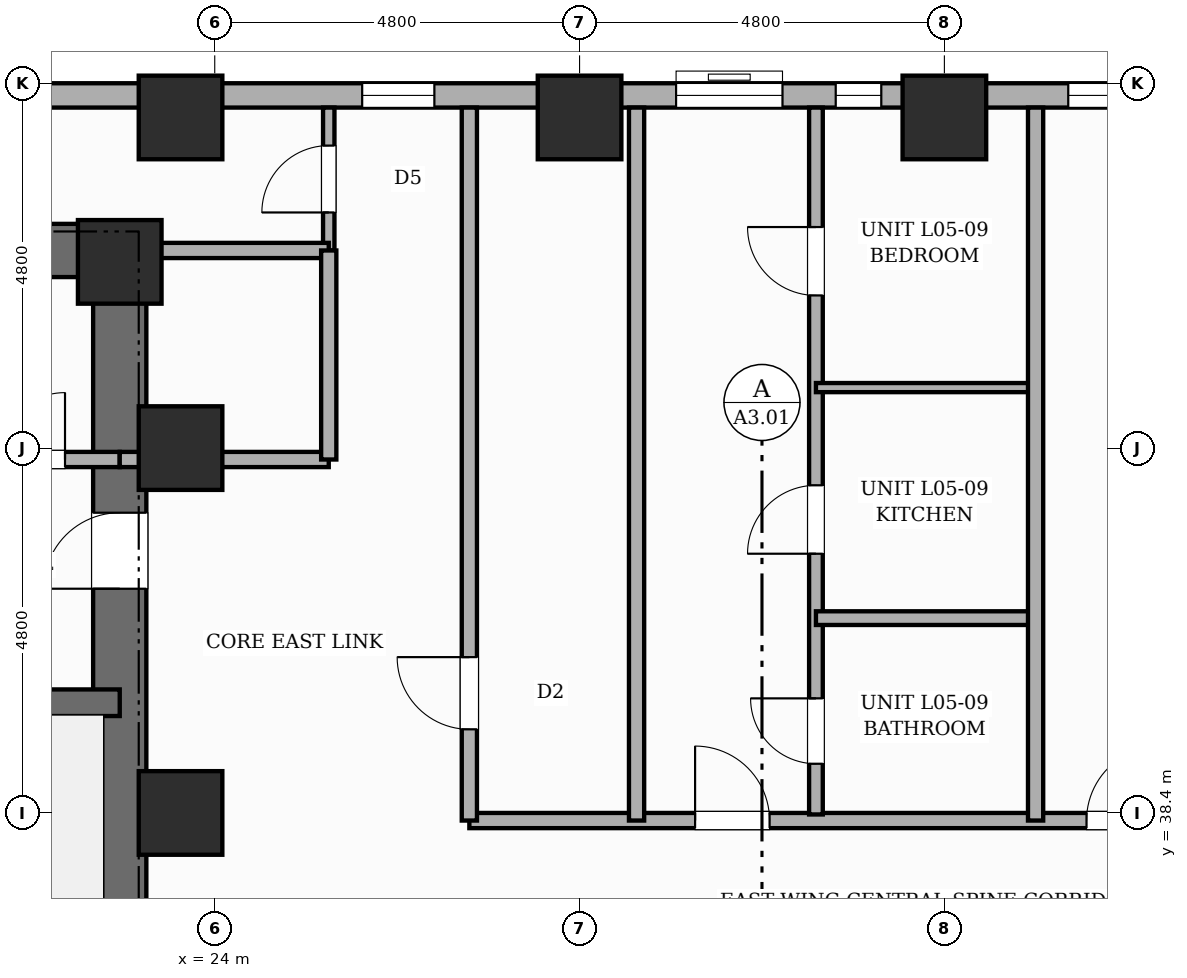
"""IFC4 building model, lengths in metres.
Left out: names, types, materials, properties, quantities, classifications, styles, units other than length and angle.
Written with IfcOpenShell. Run it as: python <this file> out.ifc"""

import sys

from ifc_helpers import new_model, si_unit, direction, frame, frame_2d, origin, origin_2d, place, context, subcontext, project, spatial, rectangle, extrude, element, fill, save


model = new_model("IFC4")
c1 = context("Model", 3, precision=1e-05, world=origin(), true_north=direction((0.0, 1.0)))
c2 = subcontext(c1, "Body", "Model", "MODEL_VIEW")
j1 = project(units=[si_unit("LENGTHUNIT", "METRE"), si_unit("PLANEANGLEUNIT", "RADIAN")], contexts=[c1])
p1 = place(None, origin())
s1 = spatial("IfcSite", under=j1, at=p1, CompositionType="ELEMENT")
p2 = place(p1, origin())
s2 = spatial("IfcBuilding", under=s1, at=p2, CompositionType="ELEMENT")
p3 = place(p2, frame((0.0, 0.0, 25.0)))
s3 = spatial("IfcBuildingStorey", under=s2, at=p3, CompositionType="ELEMENT", Elevation=25.0)
p4 = place(p3, frame((22.75, 30.55, 0.0), z_axis=(0.0, 0.0, 1.0), x_axis=(0.0, 1.0, 0.0)))
e1 = element("IfcWall", 1, at=p4, inside=s3, PredefinedType="SHEAR", context=c2, shape_type="SweptSolid", body=[
    extrude(rectangle(XDim=15.6, YDim=0.7, at=frame_2d((7.8, 0.0))), origin(), (0.0, 0.0, 1.0), 3.6),
])
p5 = place(p4, frame((10.8, 0.0, 0.0)))
e2 = element("IfcOpeningElement", 2, at=p5, cuts=e1, PredefinedType="OPENING", context=c2, shape_type="SweptSolid", body=[
    extrude(rectangle(XDim=1.0, YDim=2.15, at=frame_2d((0.5, 1.075))), frame((0.0, 0.36, 0.0), z_axis=(0.0, -1.0, 0.0), x_axis=(1.0, 0.0, 0.0)), (0.0, 0.0, 1.0), 0.72),
])
p6 = place(p3, frame((6.05, 45.8, 0.0), z_axis=(0.0, 0.0, 1.0), x_axis=(1.0, 0.0, 0.0)))
e3 = element("IfcWall", 3, at=p6, inside=s3, PredefinedType="SHEAR", context=c2, shape_type="SweptSolid", body=[
    extrude(rectangle(XDim=16.7, YDim=0.7, at=frame_2d((8.35, 0.0))), origin(), (0.0, 0.0, 1.0), 3.6),
])
p7 = place(p3, frame((18.84, 39.85, 0.0), z_axis=(0.0, 0.0, 1.0), x_axis=(1.0, 0.0, 0.0)))
e4 = element("IfcWall", 4, at=p7, inside=s3, PredefinedType="SHEAR", context=c2, shape_type="SweptSolid", body=[
    extrude(rectangle(XDim=3.91, YDim=0.35, at=frame_2d((1.955, 0.0))), origin(), (0.0, 0.0, 1.0), 3.6),
])
for number, where, z_axis, x_axis in (
    (5, (22.75, 45.65, 0.0), (0.0, 0.0, 1.0), (1.0, 0.0, 0.0)),
    (6, (23.55, 38.4, 0.0), (0.0, 0.0, 1.0), (1.0, 0.0, 0.0)),
    (7, (23.55, 43.2, 0.0), (0.0, 0.0, 1.0), (1.0, 0.0, 0.0)),
    (8, (23.55, 47.55, 0.0), (0.0, 0.0, 1.0), (1.0, 0.0, 0.0)),
    (9, (28.8, 47.55, 0.0), (0.0, 0.0, 1.0), (1.0, 0.0, 0.0)),
    (10, (33.6, 47.55, 0.0), (0.0, 0.0, 1.0), (1.0, 0.0, 0.0)),
):
    element("IfcColumn", number, at=place(p3, frame(where, z_axis=z_axis, x_axis=x_axis)), inside=s3, PredefinedType="COLUMN", context=c2, shape_type="SweptSolid", body=[
        extrude(rectangle(XDim=1.1, YDim=1.1, at=origin_2d()), origin(), (0.0, 0.0, 1.0), 3.6),
    ])
p8 = place(p3, frame((7.2, 47.84, 0.0), z_axis=(0.0, 0.0, 1.0), x_axis=(1.0, 0.0, 0.0)))
e11 = element("IfcWall", 11, at=p8, inside=s3, PredefinedType="STANDARD", context=c2, shape_type="SweptSolid", body=[
    extrude(rectangle(XDim=48.0, YDim=0.32, at=frame_2d((24.0, 0.0))), origin(), (0.0, 0.0, 1.0), 2.53),
])
p9 = place(p8, frame((24.97, 0.0, 0.45)))
e12 = element("IfcOpeningElement", 12, at=p9, cuts=e11, PredefinedType="OPENING", context=c2, shape_type="SweptSolid", body=[
    extrude(rectangle(XDim=0.6, YDim=1.8, at=frame_2d((0.3, 0.9))), frame((0.0, 0.17, 0.0), z_axis=(0.0, -1.0, 0.0), x_axis=(1.0, 0.0, 0.0)), (0.0, 0.0, 1.0), 0.34),
])
p10 = place(p8, frame((32.435, 0.0, 0.65)))
e13 = element("IfcOpeningElement", 13, at=p10, cuts=e11, PredefinedType="OPENING", context=c2, shape_type="SweptSolid", body=[
    extrude(rectangle(XDim=1.4, YDim=1.1, at=frame_2d((0.7, 0.55))), frame((0.0, 0.17, 0.0), z_axis=(0.0, -1.0, 0.0), x_axis=(1.0, 0.0, 0.0)), (0.0, 0.0, 1.0), 0.34),
])
p11 = place(p8, frame((47.094, 0.0, 0.45)))
e14 = element("IfcOpeningElement", 14, at=p11, cuts=e11, PredefinedType="OPENING", context=c2, shape_type="SweptSolid", body=[
    extrude(rectangle(XDim=0.6, YDim=1.8, at=frame_2d((0.3, 0.9))), frame((0.0, 0.17, 0.0), z_axis=(0.0, -1.0, 0.0), x_axis=(1.0, 0.0, 0.0)), (0.0, 0.0, 1.0), 0.34),
])
p12 = place(p8, frame((18.74, 0.0, 0.45)))
e15 = element("IfcOpeningElement", 15, at=p12, cuts=e11, PredefinedType="OPENING", context=c2, shape_type="SweptSolid", body=[
    extrude(rectangle(XDim=0.95, YDim=1.8, at=frame_2d((0.475, 0.9))), frame((0.0, 0.17, 0.0), z_axis=(0.0, -1.0, 0.0), x_axis=(1.0, 0.0, 0.0)), (0.0, 0.0, 1.0), 0.34),
])
p13 = place(p8, frame((41.65, 0.0, 0.45)))
e16 = element("IfcOpeningElement", 16, at=p13, cuts=e11, PredefinedType="OPENING", context=c2, shape_type="SweptSolid", body=[
    extrude(rectangle(XDim=0.75, YDim=1.8, at=frame_2d((0.375, 0.9))), frame((0.0, 0.17, 0.0), z_axis=(0.0, -1.0, 0.0), x_axis=(1.0, 0.0, 0.0)), (0.0, 0.0, 1.0), 0.34),
])
p14 = place(p8, frame((37.736, 0.0, 0.65)))
e17 = element("IfcOpeningElement", 17, at=p14, cuts=e11, PredefinedType="OPENING", context=c2, shape_type="SweptSolid", body=[
    extrude(rectangle(XDim=1.4, YDim=1.1, at=frame_2d((0.7, 0.55))), frame((0.0, 0.17, 0.0), z_axis=(0.0, -1.0, 0.0), x_axis=(1.0, 0.0, 0.0)), (0.0, 0.0, 1.0), 0.34),
])
p15 = place(p8, frame((0.47, 0.0, 0.45)))
e18 = element("IfcOpeningElement", 18, at=p15, cuts=e11, PredefinedType="OPENING", context=c2, shape_type="SweptSolid", body=[
    extrude(rectangle(XDim=0.95, YDim=1.8, at=frame_2d((0.475, 0.9))), frame((0.0, 0.17, 0.0), z_axis=(0.0, -1.0, 0.0), x_axis=(1.0, 0.0, 0.0)), (0.0, 0.0, 1.0), 0.34),
])
p16 = place(p8, frame((10.215, 0.0, 0.45)))
e19 = element("IfcOpeningElement", 19, at=p16, cuts=e11, PredefinedType="OPENING", context=c2, shape_type="SweptSolid", body=[
    extrude(rectangle(XDim=0.95, YDim=1.8, at=frame_2d((0.475, 0.9))), frame((0.0, 0.17, 0.0), z_axis=(0.0, -1.0, 0.0), x_axis=(1.0, 0.0, 0.0)), (0.0, 0.0, 1.0), 0.34),
])
p17 = place(p8, frame((22.87, 0.0, 0.65)))
e20 = element("IfcOpeningElement", 20, at=p17, cuts=e11, PredefinedType="OPENING", context=c2, shape_type="SweptSolid", body=[
    extrude(rectangle(XDim=1.4, YDim=1.1, at=frame_2d((0.7, 0.55))), frame((0.0, 0.17, 0.0), z_axis=(0.0, -1.0, 0.0), x_axis=(1.0, 0.0, 0.0)), (0.0, 0.0, 1.0), 0.34),
])
p18 = place(p8, frame((28.03, 0.0, 0.65)))
e21 = element("IfcOpeningElement", 21, at=p18, cuts=e11, PredefinedType="OPENING", context=c2, shape_type="SweptSolid", body=[
    extrude(rectangle(XDim=1.4, YDim=1.1, at=frame_2d((0.7, 0.55))), frame((0.0, 0.17, 0.0), z_axis=(0.0, -1.0, 0.0), x_axis=(1.0, 0.0, 0.0)), (0.0, 0.0, 1.0), 0.34),
])
p19 = place(p8, frame((42.95, 0.0, 0.65)))
e22 = element("IfcOpeningElement", 22, at=p19, cuts=e11, PredefinedType="OPENING", context=c2, shape_type="SweptSolid", body=[
    extrude(rectangle(XDim=1.4, YDim=1.1, at=frame_2d((0.7, 0.55))), frame((0.0, 0.17, 0.0), z_axis=(0.0, -1.0, 0.0), x_axis=(1.0, 0.0, 0.0)), (0.0, 0.0, 1.0), 0.34),
])
p20 = place(p8, frame((45.984, 0.0, 0.45)))
e23 = element("IfcOpeningElement", 23, at=p20, cuts=e11, PredefinedType="OPENING", context=c2, shape_type="SweptSolid", body=[
    extrude(rectangle(XDim=0.6, YDim=1.8, at=frame_2d((0.3, 0.9))), frame((0.0, 0.17, 0.0), z_axis=(0.0, -1.0, 0.0), x_axis=(1.0, 0.0, 0.0)), (0.0, 0.0, 1.0), 0.34),
])
p21 = place(p3, frame((20.5, 43.05, 0.0), z_axis=(0.0, 0.0, 1.0), x_axis=(1.0, 0.0, 0.0)))
e24 = element("IfcWall", 24, at=p21, inside=s3, PredefinedType="POLYGONAL", context=c2, shape_type="SweptSolid", body=[
    extrude(rectangle(XDim=2.25, YDim=0.2, at=frame_2d((1.125, 0.0))), origin(), (0.0, 0.0, 1.0), 2.53),
])
p22 = place(p21, frame((0.65, 0.0, 0.0)))
e25 = element("IfcOpeningElement", 25, at=p22, cuts=e24, PredefinedType="OPENING", context=c2, shape_type="SweptSolid", body=[
    extrude(rectangle(XDim=0.88, YDim=2.1, at=frame_2d((0.44, 1.05))), frame((0.0, 0.11, 0.0), z_axis=(0.0, -1.0, 0.0), x_axis=(1.0, 0.0, 0.0)), (0.0, 0.0, 1.0), 0.22),
])
p23 = place(p3, frame((25.5, 45.8, 0.0), z_axis=(0.0, 0.0, 1.0), x_axis=(0.0, 1.0, 0.0)))
e26 = element("IfcWall", 26, at=p23, inside=s3, PredefinedType="PARTITIONING", context=c2, shape_type="SweptSolid", body=[
    extrude(rectangle(XDim=1.88, YDim=0.15, at=frame_2d((0.94, 0.0))), origin(), (0.0, 0.0, 1.0), 3.35),
])
p24 = place(p23, frame((0.5, 0.0, 0.0)))
e27 = element("IfcOpeningElement", 27, at=p24, cuts=e26, PredefinedType="OPENING", context=c2, shape_type="SweptSolid", body=[
    extrude(rectangle(XDim=0.88, YDim=2.1, at=frame_2d((0.44, 1.05))), frame((0.0, 0.085, 0.0), z_axis=(0.0, -1.0, 0.0), x_axis=(1.0, 0.0, 0.0)), (0.0, 0.0, 1.0), 0.17),
])
p25 = place(p3, frame((22.75, 45.8, 0.0), z_axis=(0.0, 0.0, 1.0), x_axis=(1.0, 0.0, 0.0)))
e28 = element("IfcWall", 28, at=p25, inside=s3, PredefinedType="PARTITIONING", context=c2, shape_type="SweptSolid", body=[
    extrude(rectangle(XDim=2.75, YDim=0.2, at=frame_2d((1.375, 0.0))), origin(), (0.0, 0.0, 1.0), 3.35),
])
p26 = place(p3, frame((27.35, 38.3, 0.0), z_axis=(0.0, 0.0, 1.0), x_axis=(1.0, 0.0, 0.0)))
e29 = element("IfcWall", 29, at=p26, inside=s3, PredefinedType="PARTITIONING", context=c2, shape_type="SweptSolid", body=[
    extrude(rectangle(XDim=14.43, YDim=0.2, at=frame_2d((7.215, 0.0))), origin(), (0.0, 0.0, 1.0), 3.35),
])
p27 = place(p26, frame((2.97, 0.0, 0.0)))
e30 = element("IfcOpeningElement", 30, at=p27, cuts=e29, PredefinedType="OPENING", context=c2, shape_type="SweptSolid", body=[
    extrude(rectangle(XDim=0.98, YDim=2.18, at=frame_2d((0.49, 1.09))), frame((0.0, 0.11, 0.0), z_axis=(0.0, -1.0, 0.0), x_axis=(1.0, 0.0, 0.0)), (0.0, 0.0, 1.0), 0.22),
])
p28 = place(p26, frame((8.12, 0.0, 0.0)))
e31 = element("IfcOpeningElement", 31, at=p28, cuts=e29, PredefinedType="OPENING", context=c2, shape_type="SweptSolid", body=[
    extrude(rectangle(XDim=0.98, YDim=2.18, at=frame_2d((0.49, 1.09))), frame((0.0, 0.11, 0.0), z_axis=(0.0, -1.0, 0.0), x_axis=(1.0, 0.0, 0.0)), (0.0, 0.0, 1.0), 0.22),
])
p29 = place(p3, frame((27.35, 38.3, 0.0), z_axis=(0.0, 0.0, 1.0), x_axis=(0.0, 1.0, 0.0)))
e32 = element("IfcWall", 32, at=p29, inside=s3, PredefinedType="PARTITIONING", context=c2, shape_type="SweptSolid", body=[
    extrude(rectangle(XDim=9.38, YDim=0.2, at=frame_2d((4.69, 0.0))), origin(), (0.0, 0.0, 1.0), 3.35),
])
p30 = place(p29, frame((1.2, 0.0, 0.0)))
e33 = element("IfcOpeningElement", 33, at=p30, cuts=e32, PredefinedType="OPENING", context=c2, shape_type="SweptSolid", body=[
    extrude(rectangle(XDim=0.95, YDim=2.15, at=frame_2d((0.475, 1.075))), frame((0.0, 0.11, 0.0), z_axis=(0.0, -1.0, 0.0), x_axis=(1.0, 0.0, 0.0)), (0.0, 0.0, 1.0), 0.22),
])
p31 = place(p3, frame((22.75, 43.05, 0.0), z_axis=(0.0, 0.0, 1.0), x_axis=(1.0, 0.0, 0.0)))
e34 = element("IfcWall", 34, at=p31, inside=s3, PredefinedType="PARTITIONING", context=c2, shape_type="SweptSolid", body=[
    extrude(rectangle(XDim=2.75, YDim=0.2, at=frame_2d((1.375, 0.0))), origin(), (0.0, 0.0, 1.0), 2.53),
])
p32 = place(p3, frame((25.5, 43.05, 0.0), z_axis=(0.0, 0.0, 1.0), x_axis=(0.0, 1.0, 0.0)))
e35 = element("IfcWall", 35, at=p32, inside=s3, PredefinedType="PARTITIONING", context=c2, shape_type="SweptSolid", body=[
    extrude(rectangle(XDim=2.75, YDim=0.2, at=frame_2d((1.375, 0.0))), origin(), (0.0, 0.0, 1.0), 3.35),
])
p33 = place(p3, frame((29.55, 38.3, 0.0), z_axis=(0.0, 0.0, 1.0), x_axis=(0.0, 1.0, 0.0)))
e36 = element("IfcWall", 36, at=p33, inside=s3, PredefinedType="SOLIDWALL", context=c2, shape_type="SweptSolid", body=[
    extrude(rectangle(XDim=9.38, YDim=0.2, at=frame_2d((4.69, 0.0))), origin(), (0.0, 0.0, 1.0), 3.35),
])
p34 = place(p3, frame((31.91, 38.38, 0.0), z_axis=(0.0, 0.0, 1.0), x_axis=(0.0, 1.0, 0.0)))
e37 = element("IfcWall", 37, at=p34, inside=s3, PredefinedType="PLUMBINGWALL", context=c2, shape_type="SweptSolid", body=[
    extrude(rectangle(XDim=9.3, YDim=0.18, at=frame_2d((4.65, 0.0))), origin(), (0.0, 0.0, 1.0), 3.35),
])
p35 = place(p34, frame((0.667, 0.0, 0.0)))
e38 = element("IfcOpeningElement", 38, at=p35, cuts=e37, PredefinedType="OPENING", context=c2, shape_type="SweptSolid", body=[
    extrude(rectangle(XDim=0.86, YDim=2.1, at=frame_2d((0.43, 1.05))), frame((0.0, 0.1, 0.0), z_axis=(0.0, -1.0, 0.0), x_axis=(1.0, 0.0, 0.0)), (0.0, 0.0, 1.0), 0.2),
])
p36 = place(p34, frame((3.43, 0.0, 0.0)))
e39 = element("IfcOpeningElement", 39, at=p36, cuts=e37, PredefinedType="OPENING", context=c2, shape_type="SweptSolid", body=[
    extrude(rectangle(XDim=0.9, YDim=2.15, at=frame_2d((0.45, 1.075))), frame((0.0, 0.1, 0.0), z_axis=(0.0, -1.0, 0.0), x_axis=(1.0, 0.0, 0.0)), (0.0, 0.0, 1.0), 0.2),
])
p37 = place(p34, frame((6.828, 0.0, 0.0)))
e40 = element("IfcOpeningElement", 40, at=p37, cuts=e37, PredefinedType="OPENING", context=c2, shape_type="SweptSolid", body=[
    extrude(rectangle(XDim=0.9, YDim=2.15, at=frame_2d((0.45, 1.075))), frame((0.0, 0.1, 0.0), z_axis=(0.0, -1.0, 0.0), x_axis=(1.0, 0.0, 0.0)), (0.0, 0.0, 1.0), 0.2),
])
p38 = place(p3, frame((31.91, 40.963, 0.0), z_axis=(0.0, 0.0, 1.0), x_axis=(1.0, 0.0, 0.0)))
e41 = element("IfcWall", 41, at=p38, inside=s3, PredefinedType="PLUMBINGWALL", context=c2, shape_type="SweptSolid", body=[
    extrude(rectangle(XDim=2.91, YDim=0.18, at=frame_2d((1.455, 0.0))), origin(), (0.0, 0.0, 1.0), 3.35),
])
p39 = place(p3, frame((31.91, 43.996, 0.0), z_axis=(0.0, 0.0, 1.0), x_axis=(1.0, 0.0, 0.0)))
e42 = element("IfcWall", 42, at=p39, inside=s3, PredefinedType="PARTITIONING", context=c2, shape_type="SweptSolid", body=[
    extrude(rectangle(XDim=2.91, YDim=0.12, at=frame_2d((1.455, 0.0))), origin(), (0.0, 0.0, 1.0), 3.35),
])
p40 = place(p3, frame((34.8, 38.3, 0.0), z_axis=(0.0, 0.0, 1.0), x_axis=(0.0, 1.0, 0.0)))
e43 = element("IfcWall", 43, at=p40, inside=s3, PredefinedType="SOLIDWALL", context=c2, shape_type="SweptSolid", body=[
    extrude(rectangle(XDim=9.38, YDim=0.2, at=frame_2d((4.69, 0.0))), origin(), (0.0, 0.0, 1.0), 3.35),
])
p41 = place(p9, origin())
e44 = element("IfcWindow", 44, at=p41, inside=s3, PartitioningType="SINGLE_PANEL", PredefinedType="WINDOW", context=c2, shape_type="SweptSolid", body=[
    extrude(rectangle(XDim=0.6, YDim=1.8, at=frame_2d((0.3, 0.9))), frame((0.0, 0.03, 0.0), z_axis=(0.0, -1.0, 0.0), x_axis=(1.0, 0.0, 0.0)), (0.0, 0.0, 1.0), 0.06),
])
fill(e12, e44)
p42 = place(p12, origin())
e45 = element("IfcWindow", 45, at=p42, inside=s3, PartitioningType="SINGLE_PANEL", PredefinedType="WINDOW", context=c2, shape_type="SweptSolid", body=[
    extrude(rectangle(XDim=0.95, YDim=1.8, at=frame_2d((0.475, 0.9))), frame((0.0, 0.03, 0.0), z_axis=(0.0, -1.0, 0.0), x_axis=(1.0, 0.0, 0.0)), (0.0, 0.0, 1.0), 0.06),
])
fill(e15, e45)
p43 = place(p17, origin())
e46 = element("IfcWindow", 46, at=p43, inside=s3, PartitioningType="SINGLE_PANEL", PredefinedType="WINDOW", context=c2, shape_type="SweptSolid", body=[
    extrude(rectangle(XDim=1.4, YDim=1.1, at=frame_2d((0.7, 0.55))), frame((0.0, 0.03, 0.0), z_axis=(0.0, -1.0, 0.0), x_axis=(1.0, 0.0, 0.0)), (0.0, 0.0, 1.0), 0.06),
])
fill(e20, e46)
p44 = place(p18, origin())
e47 = element("IfcWindow", 47, at=p44, inside=s3, PartitioningType="SINGLE_PANEL", PredefinedType="WINDOW", context=c2, shape_type="SweptSolid", body=[
    extrude(rectangle(XDim=1.4, YDim=1.1, at=frame_2d((0.7, 0.55))), frame((0.0, 0.03, 0.0), z_axis=(0.0, -1.0, 0.0), x_axis=(1.0, 0.0, 0.0)), (0.0, 0.0, 1.0), 0.06),
])
fill(e21, e47)
p45 = place(p5, origin())
e48 = element("IfcDoor", 48, at=p45, inside=s3, OperationType="SINGLE_SWING_LEFT", PredefinedType="DOOR", context=c2, shape_type="SweptSolid", body=[
    extrude(rectangle(XDim=1.0, YDim=2.15, at=frame_2d((0.5, 1.075))), frame((0.0, 0.025, 0.0), z_axis=(0.0, -1.0, 0.0), x_axis=(1.0, 0.0, 0.0)), (0.0, 0.0, 1.0), 0.05),
])
fill(e2, e48)
p46 = place(p22, origin())
e49 = element("IfcDoor", 49, at=p46, inside=s3, OperationType="SINGLE_SWING_RIGHT", PredefinedType="DOOR", context=c2, shape_type="SweptSolid", body=[
    extrude(rectangle(XDim=0.88, YDim=2.1, at=frame_2d((0.44, 1.05))), frame((0.0, 0.025, 0.0), z_axis=(0.0, -1.0, 0.0), x_axis=(1.0, 0.0, 0.0)), (0.0, 0.0, 1.0), 0.05),
])
fill(e25, e49)
p47 = place(p24, origin())
e50 = element("IfcDoor", 50, at=p47, inside=s3, OperationType="SINGLE_SWING_LEFT", PredefinedType="DOOR", context=c2, shape_type="SweptSolid", body=[
    extrude(rectangle(XDim=0.88, YDim=2.1, at=frame_2d((0.44, 1.05))), frame((0.0, 0.025, 0.0), z_axis=(0.0, -1.0, 0.0), x_axis=(1.0, 0.0, 0.0)), (0.0, 0.0, 1.0), 0.05),
])
fill(e27, e50)
p48 = place(p30, origin())
e51 = element("IfcDoor", 51, at=p48, inside=s3, OperationType="SINGLE_SWING_RIGHT", PredefinedType="DOOR", context=c2, shape_type="SweptSolid", body=[
    extrude(rectangle(XDim=0.95, YDim=2.15, at=frame_2d((0.475, 1.075))), frame((0.0, 0.025, 0.0), z_axis=(0.0, -1.0, 0.0), x_axis=(1.0, 0.0, 0.0)), (0.0, 0.0, 1.0), 0.05),
])
fill(e33, e51)
p49 = place(p27, origin())
e52 = element("IfcDoor", 52, at=p49, inside=s3, OperationType="SINGLE_SWING_LEFT", PredefinedType="DOOR", context=c2, shape_type="SweptSolid", body=[
    extrude(rectangle(XDim=0.98, YDim=2.18, at=frame_2d((0.49, 1.09))), frame((0.0, 0.025, 0.0), z_axis=(0.0, -1.0, 0.0), x_axis=(1.0, 0.0, 0.0)), (0.0, 0.0, 1.0), 0.05),
])
fill(e30, e52)
p50 = place(p35, origin())
e53 = element("IfcDoor", 53, at=p50, inside=s3, OperationType="SINGLE_SWING_RIGHT", PredefinedType="DOOR", context=c2, shape_type="SweptSolid", body=[
    extrude(rectangle(XDim=0.86, YDim=2.1, at=frame_2d((0.43, 1.05))), frame((0.0, 0.025, 0.0), z_axis=(0.0, -1.0, 0.0), x_axis=(1.0, 0.0, 0.0)), (0.0, 0.0, 1.0), 0.05),
])
fill(e38, e53)
p51 = place(p36, origin())
e54 = element("IfcDoor", 54, at=p51, inside=s3, OperationType="SINGLE_SWING_LEFT", PredefinedType="DOOR", context=c2, shape_type="SweptSolid", body=[
    extrude(rectangle(XDim=0.9, YDim=2.15, at=frame_2d((0.45, 1.075))), frame((0.0, 0.025, 0.0), z_axis=(0.0, -1.0, 0.0), x_axis=(1.0, 0.0, 0.0)), (0.0, 0.0, 1.0), 0.05),
])
fill(e39, e54)
p52 = place(p37, origin())
e55 = element("IfcDoor", 55, at=p52, inside=s3, OperationType="SINGLE_SWING_RIGHT", PredefinedType="DOOR", context=c2, shape_type="SweptSolid", body=[
    extrude(rectangle(XDim=0.9, YDim=2.15, at=frame_2d((0.45, 1.075))), frame((0.0, 0.025, 0.0), z_axis=(0.0, -1.0, 0.0), x_axis=(1.0, 0.0, 0.0)), (0.0, 0.0, 1.0), 0.05),
])
fill(e40, e55)
p53 = place(p28, origin())
e56 = element("IfcDoor", 56, at=p53, inside=s3, OperationType="SINGLE_SWING_RIGHT", PredefinedType="DOOR", context=c2, shape_type="SweptSolid", body=[
    extrude(rectangle(XDim=0.98, YDim=2.18, at=frame_2d((0.49, 1.09))), frame((0.0, 0.025, 0.0), z_axis=(0.0, -1.0, 0.0), x_axis=(1.0, 0.0, 0.0)), (0.0, 0.0, 1.0), 0.05),
])
fill(e31, e56)
save(model, sys.argv[1])
